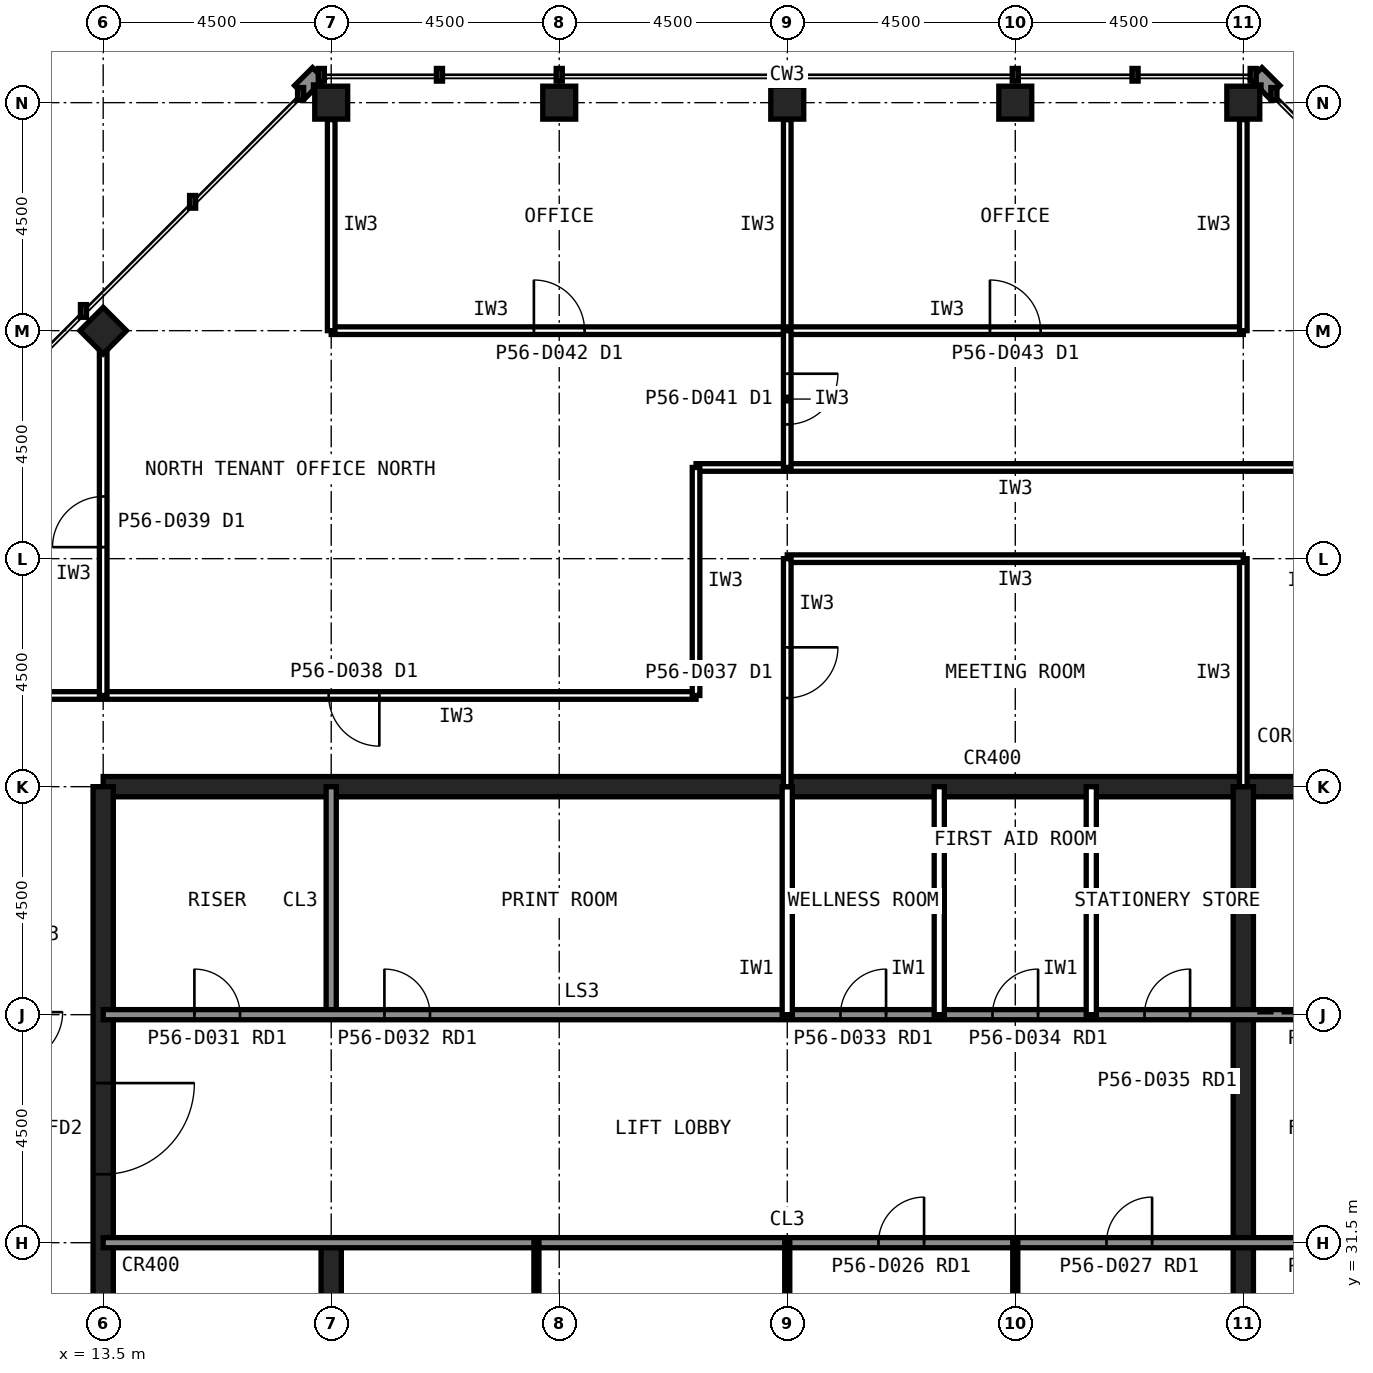
"""IFC4 building model, lengths in metres.
Left out: names, types, materials, properties, quantities, classifications, styles, units other than length and angle.
Written with IfcOpenShell. Run it as: python <this file> out.ifc"""

import sys

from ifc_helpers import new_model, si_unit, direction, frame, frame_2d, origin, origin_2d, place, context, subcontext, project, spatial, rectangle, hollow_rectangle, extrude, element, fill, save


model = new_model("IFC4")
c1 = context("Model", 3, precision=1e-05, world=origin(), true_north=direction((0.0, 1.0)))
c2 = subcontext(c1, "Body", "Model", "MODEL_VIEW")
j1 = project(units=[si_unit("LENGTHUNIT", "METRE"), si_unit("PLANEANGLEUNIT", "RADIAN")], contexts=[c1])
p1 = place(None, origin())
s1 = spatial("IfcSite", under=j1, at=p1, CompositionType="ELEMENT")
p2 = place(p1, origin())
s2 = spatial("IfcBuilding", under=s1, at=p2, CompositionType="ELEMENT")
p3 = place(p2, frame((0.0, 0.0, 238.6)))
s3 = spatial("IfcBuildingStorey", under=s2, at=p3, CompositionType="ELEMENT", Elevation=238.6)
for number, where, z_axis, x_axis in (
    (1, (36.0, 54.0, 0.0), (0.0, 0.0, 1.0), (1.0, 0.0, 0.0)),
    (2, (31.5, 54.0, 0.0), (0.0, 0.0, 1.0), (1.0, 0.0, 0.0)),
    (3, (27.0, 54.0, 0.0), (0.0, 0.0, 1.0), (1.0, 0.0, 0.0)),
    (4, (22.5, 54.0, 0.0), (0.0, 0.0, 1.0), (1.0, 0.0, 0.0)),
    (5, (18.0, 54.0, 0.0), (0.0, 0.0, 1.0), (1.0, 0.0, 0.0)),
    (6, (13.5, 49.5, 0.0), (0.0, 0.0, 1.0), (0.707, 0.707, 0.0)),
):
    element("IfcColumn", number, at=place(p3, frame(where, z_axis=z_axis, x_axis=x_axis)), inside=s3, PredefinedType="COLUMN", context=c2, shape_type="SweptSolid", body=[
        extrude(hollow_rectangle(XDim=0.65, YDim=0.65, WallThickness=0.032, at=origin_2d()), origin(), (0.0, 0.0, 1.0), 4.0),
    ])
p4 = place(p3, frame((40.5, 40.5, 0.0), z_axis=(0.0, 0.0, 1.0), x_axis=(-1.0, 0.0, 0.0)))
e7 = element("IfcWall", 7, at=p4, inside=s3, PredefinedType="SHEAR", context=c2, shape_type="SweptSolid", body=[
    extrude(rectangle(XDim=27.0, YDim=0.4, at=frame_2d((13.5, 0.0))), origin(), (0.0, 0.0, 1.0), 4.0),
])
p5 = place(p3, frame((13.5, 40.5, 0.0), z_axis=(0.0, 0.0, 1.0), x_axis=(0.0, -1.0, 0.0)))
e8 = element("IfcWall", 8, at=p5, inside=s3, PredefinedType="SHEAR", context=c2, shape_type="SweptSolid", body=[
    extrude(rectangle(XDim=27.0, YDim=0.4, at=frame_2d((13.5, 0.0))), origin(), (0.0, 0.0, 1.0), 4.0),
])
p6 = place(p5, frame((19.65, 0.0, 0.0)))
e9 = element("IfcOpeningElement", 9, at=p6, cuts=e8, PredefinedType="OPENING", context=c2, shape_type="SweptSolid", body=[
    extrude(rectangle(XDim=1.2, YDim=2.1, at=frame_2d((0.6, 1.05))), frame((0.0, 0.21, 0.0), z_axis=(0.0, -1.0, 0.0), x_axis=(1.0, 0.0, 0.0)), (0.0, 0.0, 1.0), 0.42),
])
p7 = place(p5, frame((5.85, 0.0, 0.0)))
e10 = element("IfcOpeningElement", 10, at=p7, cuts=e8, PredefinedType="OPENING", context=c2, shape_type="SweptSolid", body=[
    extrude(rectangle(XDim=1.8, YDim=2.1, at=frame_2d((0.9, 1.05))), frame((0.0, 0.21, 0.0), z_axis=(0.0, -1.0, 0.0), x_axis=(1.0, 0.0, 0.0)), (0.0, 0.0, 1.0), 0.42),
])
p8 = place(p3, frame((18.0, 13.5, 0.0), z_axis=(0.0, 0.0, 1.0), x_axis=(0.0, 1.0, 0.0)))
e11 = element("IfcWall", 11, at=p8, inside=s3, PredefinedType="SHEAR", context=c2, shape_type="SweptSolid", body=[
    extrude(rectangle(XDim=18.0, YDim=0.4, at=frame_2d((9.0, 0.0))), origin(), (0.0, 0.0, 1.0), 4.0),
])
p9 = place(p3, frame((18.0, 36.0, 0.0), z_axis=(0.0, 0.0, 1.0), x_axis=(0.0, 1.0, 0.0)))
e12 = element("IfcWall", 12, at=p9, inside=s3, PredefinedType="SOLIDWALL", context=c2, shape_type="SweptSolid", body=[
    extrude(rectangle(XDim=4.5, YDim=0.2, at=frame_2d((2.25, 0.0))), origin(), (0.0, 0.0, 1.0), 3.84),
])
p10 = place(p3, frame((36.0, 22.5, 0.0), z_axis=(0.0, 0.0, 1.0), x_axis=(0.0, 1.0, 0.0)))
e13 = element("IfcWall", 13, at=p10, inside=s3, PredefinedType="SHEAR", context=c2, shape_type="SweptSolid", body=[
    extrude(rectangle(XDim=18.0, YDim=0.4, at=frame_2d((9.0, 0.0))), origin(), (0.0, 0.0, 1.0), 4.0),
])
p11 = place(p3, frame((13.5, 36.0, 0.0), z_axis=(0.0, 0.0, 1.0), x_axis=(1.0, 0.0, 0.0)))
e14 = element("IfcWall", 14, at=p11, inside=s3, PredefinedType="SOLIDWALL", context=c2, shape_type="SweptSolid", body=[
    extrude(rectangle(XDim=27.0, YDim=0.2, at=frame_2d((13.5, 0.0))), origin(), (0.0, 0.0, 1.0), 3.84),
])
p12 = place(p11, frame((1.8, 0.0, 0.0)))
e15 = element("IfcOpeningElement", 15, at=p12, cuts=e14, PredefinedType="OPENING", context=c2, shape_type="SweptSolid", body=[
    extrude(rectangle(XDim=0.9, YDim=2.1, at=frame_2d((0.45, 1.05))), frame((0.0, 0.11, 0.0), z_axis=(0.0, -1.0, 0.0), x_axis=(1.0, 0.0, 0.0)), (0.0, 0.0, 1.0), 0.22),
])
p13 = place(p11, frame((5.55, 0.0, 0.0)))
e16 = element("IfcOpeningElement", 16, at=p13, cuts=e14, PredefinedType="OPENING", context=c2, shape_type="SweptSolid", body=[
    extrude(rectangle(XDim=0.9, YDim=2.1, at=frame_2d((0.45, 1.05))), frame((0.0, 0.11, 0.0), z_axis=(0.0, -1.0, 0.0), x_axis=(1.0, 0.0, 0.0)), (0.0, 0.0, 1.0), 0.22),
])
p14 = place(p11, frame((14.55, 0.0, 0.0)))
e17 = element("IfcOpeningElement", 17, at=p14, cuts=e14, PredefinedType="OPENING", context=c2, shape_type="SweptSolid", body=[
    extrude(rectangle(XDim=0.9, YDim=2.1, at=frame_2d((0.45, 1.05))), frame((0.0, 0.11, 0.0), z_axis=(0.0, -1.0, 0.0), x_axis=(1.0, 0.0, 0.0)), (0.0, 0.0, 1.0), 0.22),
])
p15 = place(p11, frame((17.55, 0.0, 0.0)))
e18 = element("IfcOpeningElement", 18, at=p15, cuts=e14, PredefinedType="OPENING", context=c2, shape_type="SweptSolid", body=[
    extrude(rectangle(XDim=0.9, YDim=2.1, at=frame_2d((0.45, 1.05))), frame((0.0, 0.11, 0.0), z_axis=(0.0, -1.0, 0.0), x_axis=(1.0, 0.0, 0.0)), (0.0, 0.0, 1.0), 0.22),
])
p16 = place(p11, frame((20.55, 0.0, 0.0)))
e19 = element("IfcOpeningElement", 19, at=p16, cuts=e14, PredefinedType="OPENING", context=c2, shape_type="SweptSolid", body=[
    extrude(rectangle(XDim=0.9, YDim=2.1, at=frame_2d((0.45, 1.05))), frame((0.0, 0.11, 0.0), z_axis=(0.0, -1.0, 0.0), x_axis=(1.0, 0.0, 0.0)), (0.0, 0.0, 1.0), 0.22),
])
p17 = place(p11, frame((24.1, 0.0, 0.0)))
e20 = element("IfcOpeningElement", 20, at=p17, cuts=e14, PredefinedType="OPENING", context=c2, shape_type="SweptSolid", body=[
    extrude(rectangle(XDim=1.3, YDim=2.2, at=frame_2d((0.65, 1.1))), frame((0.0, 0.11, 0.0), z_axis=(0.0, -1.0, 0.0), x_axis=(1.0, 0.0, 0.0)), (0.0, 0.0, 1.0), 0.22),
])
p18 = place(p3, frame((13.5, 31.5, 0.0), z_axis=(0.0, 0.0, 1.0), x_axis=(1.0, 0.0, 0.0)))
e21 = element("IfcWall", 21, at=p18, inside=s3, PredefinedType="SOLIDWALL", context=c2, shape_type="SweptSolid", body=[
    extrude(rectangle(XDim=27.0, YDim=0.2, at=frame_2d((13.5, 0.0))), origin(), (0.0, 0.0, 1.0), 3.84),
])
p19 = place(p18, frame((24.15, 0.0, 0.0)))
e22 = element("IfcOpeningElement", 22, at=p19, cuts=e21, PredefinedType="OPENING", context=c2, shape_type="SweptSolid", body=[
    extrude(rectangle(XDim=1.2, YDim=2.1, at=frame_2d((0.6, 1.05))), frame((0.0, 0.11, 0.0), z_axis=(0.0, -1.0, 0.0), x_axis=(1.0, 0.0, 0.0)), (0.0, 0.0, 1.0), 0.22),
])
p20 = place(p18, frame((15.3, 0.0, 0.0)))
e23 = element("IfcOpeningElement", 23, at=p20, cuts=e21, PredefinedType="OPENING", context=c2, shape_type="SweptSolid", body=[
    extrude(rectangle(XDim=0.9, YDim=2.1, at=frame_2d((0.45, 1.05))), frame((0.0, 0.11, 0.0), z_axis=(0.0, -1.0, 0.0), x_axis=(1.0, 0.0, 0.0)), (0.0, 0.0, 1.0), 0.22),
])
p21 = place(p18, frame((19.8, 0.0, 0.0)))
e24 = element("IfcOpeningElement", 24, at=p21, cuts=e21, PredefinedType="OPENING", context=c2, shape_type="SweptSolid", body=[
    extrude(rectangle(XDim=0.9, YDim=2.1, at=frame_2d((0.45, 1.05))), frame((0.0, 0.11, 0.0), z_axis=(0.0, -1.0, 0.0), x_axis=(1.0, 0.0, 0.0)), (0.0, 0.0, 1.0), 0.22),
])
for number, where, z_axis, x_axis in (
    (25, (27.0, 36.0, 0.0), (0.0, 0.0, 1.0), (0.0, 1.0, 0.0)),
    (26, (30.0, 36.0, 0.0), (0.0, 0.0, 1.0), (0.0, 1.0, 0.0)),
    (27, (33.0, 36.0, 0.0), (0.0, 0.0, 1.0), (0.0, 1.0, 0.0)),
):
    element("IfcWall", number, at=place(p3, frame(where, z_axis=z_axis, x_axis=x_axis)), inside=s3, PredefinedType="PARTITIONING", context=c2, shape_type="SweptSolid", body=[
        extrude(rectangle(XDim=4.5, YDim=0.2, at=frame_2d((2.25, 0.0))), origin(), (0.0, 0.0, 1.0), 3.84),
    ])
for number, where, z_axis, x_axis in (
    (28, (22.05, 22.5, 0.0), (0.0, 0.0, 1.0), (0.0, 1.0, 0.0)),
    (29, (27.0, 22.5, 0.0), (0.0, 0.0, 1.0), (0.0, 1.0, 0.0)),
    (30, (31.5, 22.5, 0.0), (0.0, 0.0, 1.0), (0.0, 1.0, 0.0)),
):
    element("IfcWall", number, at=place(p3, frame(where, z_axis=z_axis, x_axis=x_axis)), inside=s3, PredefinedType="PLUMBINGWALL", context=c2, shape_type="SweptSolid", body=[
        extrude(rectangle(XDim=9.0, YDim=0.1, at=frame_2d((4.5, 0.0))), origin(), (0.0, 0.0, 1.0), 3.84),
    ])
p22 = place(p3, frame((25.2, 42.3, 0.0), z_axis=(0.0, 0.0, 1.0), x_axis=(-1.0, 0.0, 0.0)))
e31 = element("IfcWall", 31, at=p22, inside=s3, PredefinedType="PARTITIONING", context=c2, shape_type="SweptSolid", body=[
    extrude(rectangle(XDim=13.5, YDim=0.15, at=frame_2d((6.75, 0.0))), origin(), (0.0, 0.0, 1.0), 3.84),
])
p23 = place(p22, frame((6.25, 0.0, 0.0)))
e32 = element("IfcOpeningElement", 32, at=p23, cuts=e31, PredefinedType="OPENING", context=c2, shape_type="SweptSolid", body=[
    extrude(rectangle(XDim=1.0, YDim=2.1, at=frame_2d((0.5, 1.05))), frame((0.0, 0.085, 0.0), z_axis=(0.0, -1.0, 0.0), x_axis=(1.0, 0.0, 0.0)), (0.0, 0.0, 1.0), 0.17),
])
p24 = place(p3, frame((37.8, 46.8, 0.0), z_axis=(0.0, 0.0, 1.0), x_axis=(-1.0, 0.0, 0.0)))
e33 = element("IfcWall", 33, at=p24, inside=s3, PredefinedType="PARTITIONING", context=c2, shape_type="SweptSolid", body=[
    extrude(rectangle(XDim=12.6, YDim=0.15, at=frame_2d((6.3, 0.0))), origin(), (0.0, 0.0, 1.0), 3.84),
])
p25 = place(p3, frame((25.2, 46.8, 0.0), z_axis=(0.0, 0.0, 1.0), x_axis=(0.0, -1.0, 0.0)))
e34 = element("IfcWall", 34, at=p25, inside=s3, PredefinedType="PARTITIONING", context=c2, shape_type="SweptSolid", body=[
    extrude(rectangle(XDim=4.5, YDim=0.15, at=frame_2d((2.25, 0.0))), origin(), (0.0, 0.0, 1.0), 3.84),
])
p26 = place(p3, frame((36.0, 40.5, 0.0), z_axis=(0.0, 0.0, 1.0), x_axis=(0.0, 1.0, 0.0)))
e35 = element("IfcWall", 35, at=p26, inside=s3, PredefinedType="PARTITIONING", context=c2, shape_type="SweptSolid", body=[
    extrude(rectangle(XDim=4.5, YDim=0.15, at=frame_2d((2.25, 0.0))), origin(), (0.0, 0.0, 1.0), 2.989),
])
p27 = place(p3, frame((36.0, 45.0, 0.0), z_axis=(0.0, 0.0, 1.0), x_axis=(-1.0, 0.0, 0.0)))
e36 = element("IfcWall", 36, at=p27, inside=s3, PredefinedType="PARTITIONING", context=c2, shape_type="SweptSolid", body=[
    extrude(rectangle(XDim=9.0, YDim=0.15, at=frame_2d((4.5, 0.0))), origin(), (0.0, 0.0, 1.0), 3.84),
])
p28 = place(p3, frame((27.0, 45.0, 0.0), z_axis=(0.0, 0.0, 1.0), x_axis=(0.0, -1.0, 0.0)))
e37 = element("IfcWall", 37, at=p28, inside=s3, PredefinedType="PARTITIONING", context=c2, shape_type="SweptSolid", body=[
    extrude(rectangle(XDim=4.5, YDim=0.15, at=frame_2d((2.25, 0.0))), origin(), (0.0, 0.0, 1.0), 2.989),
])
p29 = place(p28, frame((1.75, 0.0, 0.0)))
e38 = element("IfcOpeningElement", 38, at=p29, cuts=e37, PredefinedType="OPENING", context=c2, shape_type="SweptSolid", body=[
    extrude(rectangle(XDim=1.0, YDim=2.1, at=frame_2d((0.5, 1.05))), frame((0.0, 0.085, 0.0), z_axis=(0.0, -1.0, 0.0), x_axis=(1.0, 0.0, 0.0)), (0.0, 0.0, 1.0), 0.17),
])
p30 = place(p3, frame((18.0, 49.5, 0.0), z_axis=(0.0, 0.0, 1.0), x_axis=(1.0, 0.0, 0.0)))
e39 = element("IfcWall", 39, at=p30, inside=s3, PredefinedType="PARTITIONING", context=c2, shape_type="SweptSolid", body=[
    extrude(rectangle(XDim=9.0, YDim=0.15, at=frame_2d((4.5, 0.0))), origin(), (0.0, 0.0, 1.0), 3.84),
])
p31 = place(p30, frame((4.0, 0.0, 0.0)))
e40 = element("IfcOpeningElement", 40, at=p31, cuts=e39, PredefinedType="OPENING", context=c2, shape_type="SweptSolid", body=[
    extrude(rectangle(XDim=1.0, YDim=2.1, at=frame_2d((0.5, 1.05))), frame((0.0, 0.085, 0.0), z_axis=(0.0, -1.0, 0.0), x_axis=(1.0, 0.0, 0.0)), (0.0, 0.0, 1.0), 0.17),
])
for number, where, z_axis, x_axis in (
    (41, (27.0, 49.5, 0.0), (0.0, 0.0, 1.0), (0.0, 1.0, 0.0)),
    (42, (18.0, 53.665, 0.0), (0.0, 0.0, 1.0), (0.0, -1.0, 0.0)),
):
    element("IfcWall", number, at=place(p3, frame(where, z_axis=z_axis, x_axis=x_axis)), inside=s3, PredefinedType="PARTITIONING", context=c2, shape_type="SweptSolid", body=[
        extrude(rectangle(XDim=4.165, YDim=0.15, at=frame_2d((2.083, 0.0))), origin(), (0.0, 0.0, 1.0), 2.989),
    ])
p32 = place(p3, frame((27.0, 49.5, 0.0), z_axis=(0.0, 0.0, 1.0), x_axis=(1.0, 0.0, 0.0)))
e43 = element("IfcWall", 43, at=p32, inside=s3, PredefinedType="PARTITIONING", context=c2, shape_type="SweptSolid", body=[
    extrude(rectangle(XDim=9.0, YDim=0.15, at=frame_2d((4.5, 0.0))), origin(), (0.0, 0.0, 1.0), 3.84),
])
p33 = place(p32, frame((4.0, 0.0, 0.0)))
e44 = element("IfcOpeningElement", 44, at=p33, cuts=e43, PredefinedType="OPENING", context=c2, shape_type="SweptSolid", body=[
    extrude(rectangle(XDim=1.0, YDim=2.1, at=frame_2d((0.5, 1.05))), frame((0.0, 0.085, 0.0), z_axis=(0.0, -1.0, 0.0), x_axis=(1.0, 0.0, 0.0)), (0.0, 0.0, 1.0), 0.17),
])
p34 = place(p3, frame((36.0, 49.5, 0.0), z_axis=(0.0, 0.0, 1.0), x_axis=(0.0, 1.0, 0.0)))
e45 = element("IfcWall", 45, at=p34, inside=s3, PredefinedType="PARTITIONING", context=c2, shape_type="SweptSolid", body=[
    extrude(rectangle(XDim=4.165, YDim=0.15, at=frame_2d((2.083, 0.0))), origin(), (0.0, 0.0, 1.0), 2.989),
])
p35 = place(p3, frame((13.5, 42.3, 0.0), z_axis=(0.0, 0.0, 1.0), x_axis=(0.0, 1.0, 0.0)))
e46 = element("IfcWall", 46, at=p35, inside=s3, PredefinedType="PARTITIONING", context=c2, shape_type="SweptSolid", body=[
    extrude(rectangle(XDim=6.855, YDim=0.15, at=frame_2d((3.427, 0.0))), origin(), (0.0, 0.0, 1.0), 2.989),
])
p36 = place(p35, frame((2.927, 0.0, 0.0)))
e47 = element("IfcOpeningElement", 47, at=p36, cuts=e46, PredefinedType="OPENING", context=c2, shape_type="SweptSolid", body=[
    extrude(rectangle(XDim=1.0, YDim=2.1, at=frame_2d((0.5, 1.05))), frame((0.0, 0.085, 0.0), z_axis=(0.0, -1.0, 0.0), x_axis=(1.0, 0.0, 0.0)), (0.0, 0.0, 1.0), 0.17),
])
p37 = place(p3, frame((27.0, 49.5, 0.0), z_axis=(0.0, 0.0, 1.0), x_axis=(0.0, -1.0, 0.0)))
e48 = element("IfcWall", 48, at=p37, inside=s3, PredefinedType="PARTITIONING", context=c2, shape_type="SweptSolid", body=[
    extrude(rectangle(XDim=2.7, YDim=0.15, at=frame_2d((1.35, 0.0))), origin(), (0.0, 0.0, 1.0), 2.989),
])
p38 = place(p37, frame((0.85, 0.0, 0.0)))
e49 = element("IfcOpeningElement", 49, at=p38, cuts=e48, PredefinedType="OPENING", context=c2, shape_type="SweptSolid", body=[
    extrude(rectangle(XDim=1.0, YDim=2.1, at=frame_2d((0.5, 1.05))), frame((0.0, 0.085, 0.0), z_axis=(0.0, -1.0, 0.0), x_axis=(1.0, 0.0, 0.0)), (0.0, 0.0, 1.0), 0.17),
])
p39 = place(p7, origin())
e50 = element("IfcDoor", 50, at=p39, inside=s3, OperationType="SINGLE_SWING_LEFT", PredefinedType="DOOR", context=c2, shape_type="SweptSolid", body=[
    extrude(rectangle(XDim=1.8, YDim=2.1, at=frame_2d((0.9, 1.05))), frame((0.0, 0.025, 0.0), z_axis=(0.0, -1.0, 0.0), x_axis=(1.0, 0.0, 0.0)), (0.0, 0.0, 1.0), 0.05),
])
fill(e10, e50)
p40 = place(p20, origin())
e51 = element("IfcDoor", 51, at=p40, inside=s3, OperationType="SINGLE_SWING_RIGHT", PredefinedType="DOOR", context=c2, shape_type="SweptSolid", body=[
    extrude(rectangle(XDim=0.9, YDim=2.1, at=frame_2d((0.45, 1.05))), frame((0.0, 0.025, 0.0), z_axis=(0.0, -1.0, 0.0), x_axis=(1.0, 0.0, 0.0)), (0.0, 0.0, 1.0), 0.05),
])
fill(e23, e51)
p41 = place(p21, origin())
e52 = element("IfcDoor", 52, at=p41, inside=s3, OperationType="SINGLE_SWING_RIGHT", PredefinedType="DOOR", context=c2, shape_type="SweptSolid", body=[
    extrude(rectangle(XDim=0.9, YDim=2.1, at=frame_2d((0.45, 1.05))), frame((0.0, 0.025, 0.0), z_axis=(0.0, -1.0, 0.0), x_axis=(1.0, 0.0, 0.0)), (0.0, 0.0, 1.0), 0.05),
])
fill(e24, e52)
p42 = place(p12, origin())
e53 = element("IfcDoor", 53, at=p42, inside=s3, OperationType="SINGLE_SWING_LEFT", PredefinedType="DOOR", context=c2, shape_type="SweptSolid", body=[
    extrude(rectangle(XDim=0.9, YDim=2.1, at=frame_2d((0.45, 1.05))), frame((0.0, 0.025, 0.0), z_axis=(0.0, -1.0, 0.0), x_axis=(1.0, 0.0, 0.0)), (0.0, 0.0, 1.0), 0.05),
])
fill(e15, e53)
p43 = place(p13, origin())
e54 = element("IfcDoor", 54, at=p43, inside=s3, OperationType="SINGLE_SWING_LEFT", PredefinedType="DOOR", context=c2, shape_type="SweptSolid", body=[
    extrude(rectangle(XDim=0.9, YDim=2.1, at=frame_2d((0.45, 1.05))), frame((0.0, 0.025, 0.0), z_axis=(0.0, -1.0, 0.0), x_axis=(1.0, 0.0, 0.0)), (0.0, 0.0, 1.0), 0.05),
])
fill(e16, e54)
p44 = place(p14, origin())
e55 = element("IfcDoor", 55, at=p44, inside=s3, OperationType="SINGLE_SWING_RIGHT", PredefinedType="DOOR", context=c2, shape_type="SweptSolid", body=[
    extrude(rectangle(XDim=0.9, YDim=2.1, at=frame_2d((0.45, 1.05))), frame((0.0, 0.025, 0.0), z_axis=(0.0, -1.0, 0.0), x_axis=(1.0, 0.0, 0.0)), (0.0, 0.0, 1.0), 0.05),
])
fill(e17, e55)
p45 = place(p15, origin())
e56 = element("IfcDoor", 56, at=p45, inside=s3, OperationType="SINGLE_SWING_RIGHT", PredefinedType="DOOR", context=c2, shape_type="SweptSolid", body=[
    extrude(rectangle(XDim=0.9, YDim=2.1, at=frame_2d((0.45, 1.05))), frame((0.0, 0.025, 0.0), z_axis=(0.0, -1.0, 0.0), x_axis=(1.0, 0.0, 0.0)), (0.0, 0.0, 1.0), 0.05),
])
fill(e18, e56)
p46 = place(p16, origin())
e57 = element("IfcDoor", 57, at=p46, inside=s3, OperationType="SINGLE_SWING_RIGHT", PredefinedType="DOOR", context=c2, shape_type="SweptSolid", body=[
    extrude(rectangle(XDim=0.9, YDim=2.1, at=frame_2d((0.45, 1.05))), frame((0.0, 0.025, 0.0), z_axis=(0.0, -1.0, 0.0), x_axis=(1.0, 0.0, 0.0)), (0.0, 0.0, 1.0), 0.05),
])
fill(e19, e57)
p47 = place(p23, origin())
e58 = element("IfcDoor", 58, at=p47, inside=s3, OperationType="SINGLE_SWING_LEFT", PredefinedType="DOOR", context=c2, shape_type="SweptSolid", body=[
    extrude(rectangle(XDim=1.0, YDim=2.1, at=frame_2d((0.5, 1.05))), frame((0.0, 0.025, 0.0), z_axis=(0.0, -1.0, 0.0), x_axis=(1.0, 0.0, 0.0)), (0.0, 0.0, 1.0), 0.05),
])
fill(e32, e58)
p48 = place(p29, origin())
e59 = element("IfcDoor", 59, at=p48, inside=s3, OperationType="SINGLE_SWING_LEFT", PredefinedType="DOOR", context=c2, shape_type="SweptSolid", body=[
    extrude(rectangle(XDim=1.0, YDim=2.1, at=frame_2d((0.5, 1.05))), frame((0.0, 0.025, 0.0), z_axis=(0.0, -1.0, 0.0), x_axis=(1.0, 0.0, 0.0)), (0.0, 0.0, 1.0), 0.05),
])
fill(e38, e59)
p49 = place(p31, origin())
e60 = element("IfcDoor", 60, at=p49, inside=s3, OperationType="SINGLE_SWING_LEFT", PredefinedType="DOOR", context=c2, shape_type="SweptSolid", body=[
    extrude(rectangle(XDim=1.0, YDim=2.1, at=frame_2d((0.5, 1.05))), frame((0.0, 0.025, 0.0), z_axis=(0.0, -1.0, 0.0), x_axis=(1.0, 0.0, 0.0)), (0.0, 0.0, 1.0), 0.05),
])
fill(e40, e60)
p50 = place(p33, origin())
e61 = element("IfcDoor", 61, at=p50, inside=s3, OperationType="SINGLE_SWING_LEFT", PredefinedType="DOOR", context=c2, shape_type="SweptSolid", body=[
    extrude(rectangle(XDim=1.0, YDim=2.1, at=frame_2d((0.5, 1.05))), frame((0.0, 0.025, 0.0), z_axis=(0.0, -1.0, 0.0), x_axis=(1.0, 0.0, 0.0)), (0.0, 0.0, 1.0), 0.05),
])
fill(e44, e61)
p51 = place(p36, origin())
e62 = element("IfcDoor", 62, at=p51, inside=s3, OperationType="SINGLE_SWING_LEFT", PredefinedType="DOOR", context=c2, shape_type="SweptSolid", body=[
    extrude(rectangle(XDim=1.0, YDim=2.1, at=frame_2d((0.5, 1.05))), frame((0.0, 0.025, 0.0), z_axis=(0.0, -1.0, 0.0), x_axis=(1.0, 0.0, 0.0)), (0.0, 0.0, 1.0), 0.05),
])
fill(e47, e62)
p52 = place(p38, origin())
e63 = element("IfcDoor", 63, at=p52, inside=s3, OperationType="SINGLE_SWING_LEFT", PredefinedType="DOOR", context=c2, shape_type="SweptSolid", body=[
    extrude(rectangle(XDim=1.0, YDim=2.1, at=frame_2d((0.5, 1.05))), frame((0.0, 0.025, 0.0), z_axis=(0.0, -1.0, 0.0), x_axis=(1.0, 0.0, 0.0)), (0.0, 0.0, 1.0), 0.05),
])
fill(e49, e63)
save(model, sys.argv[1])
